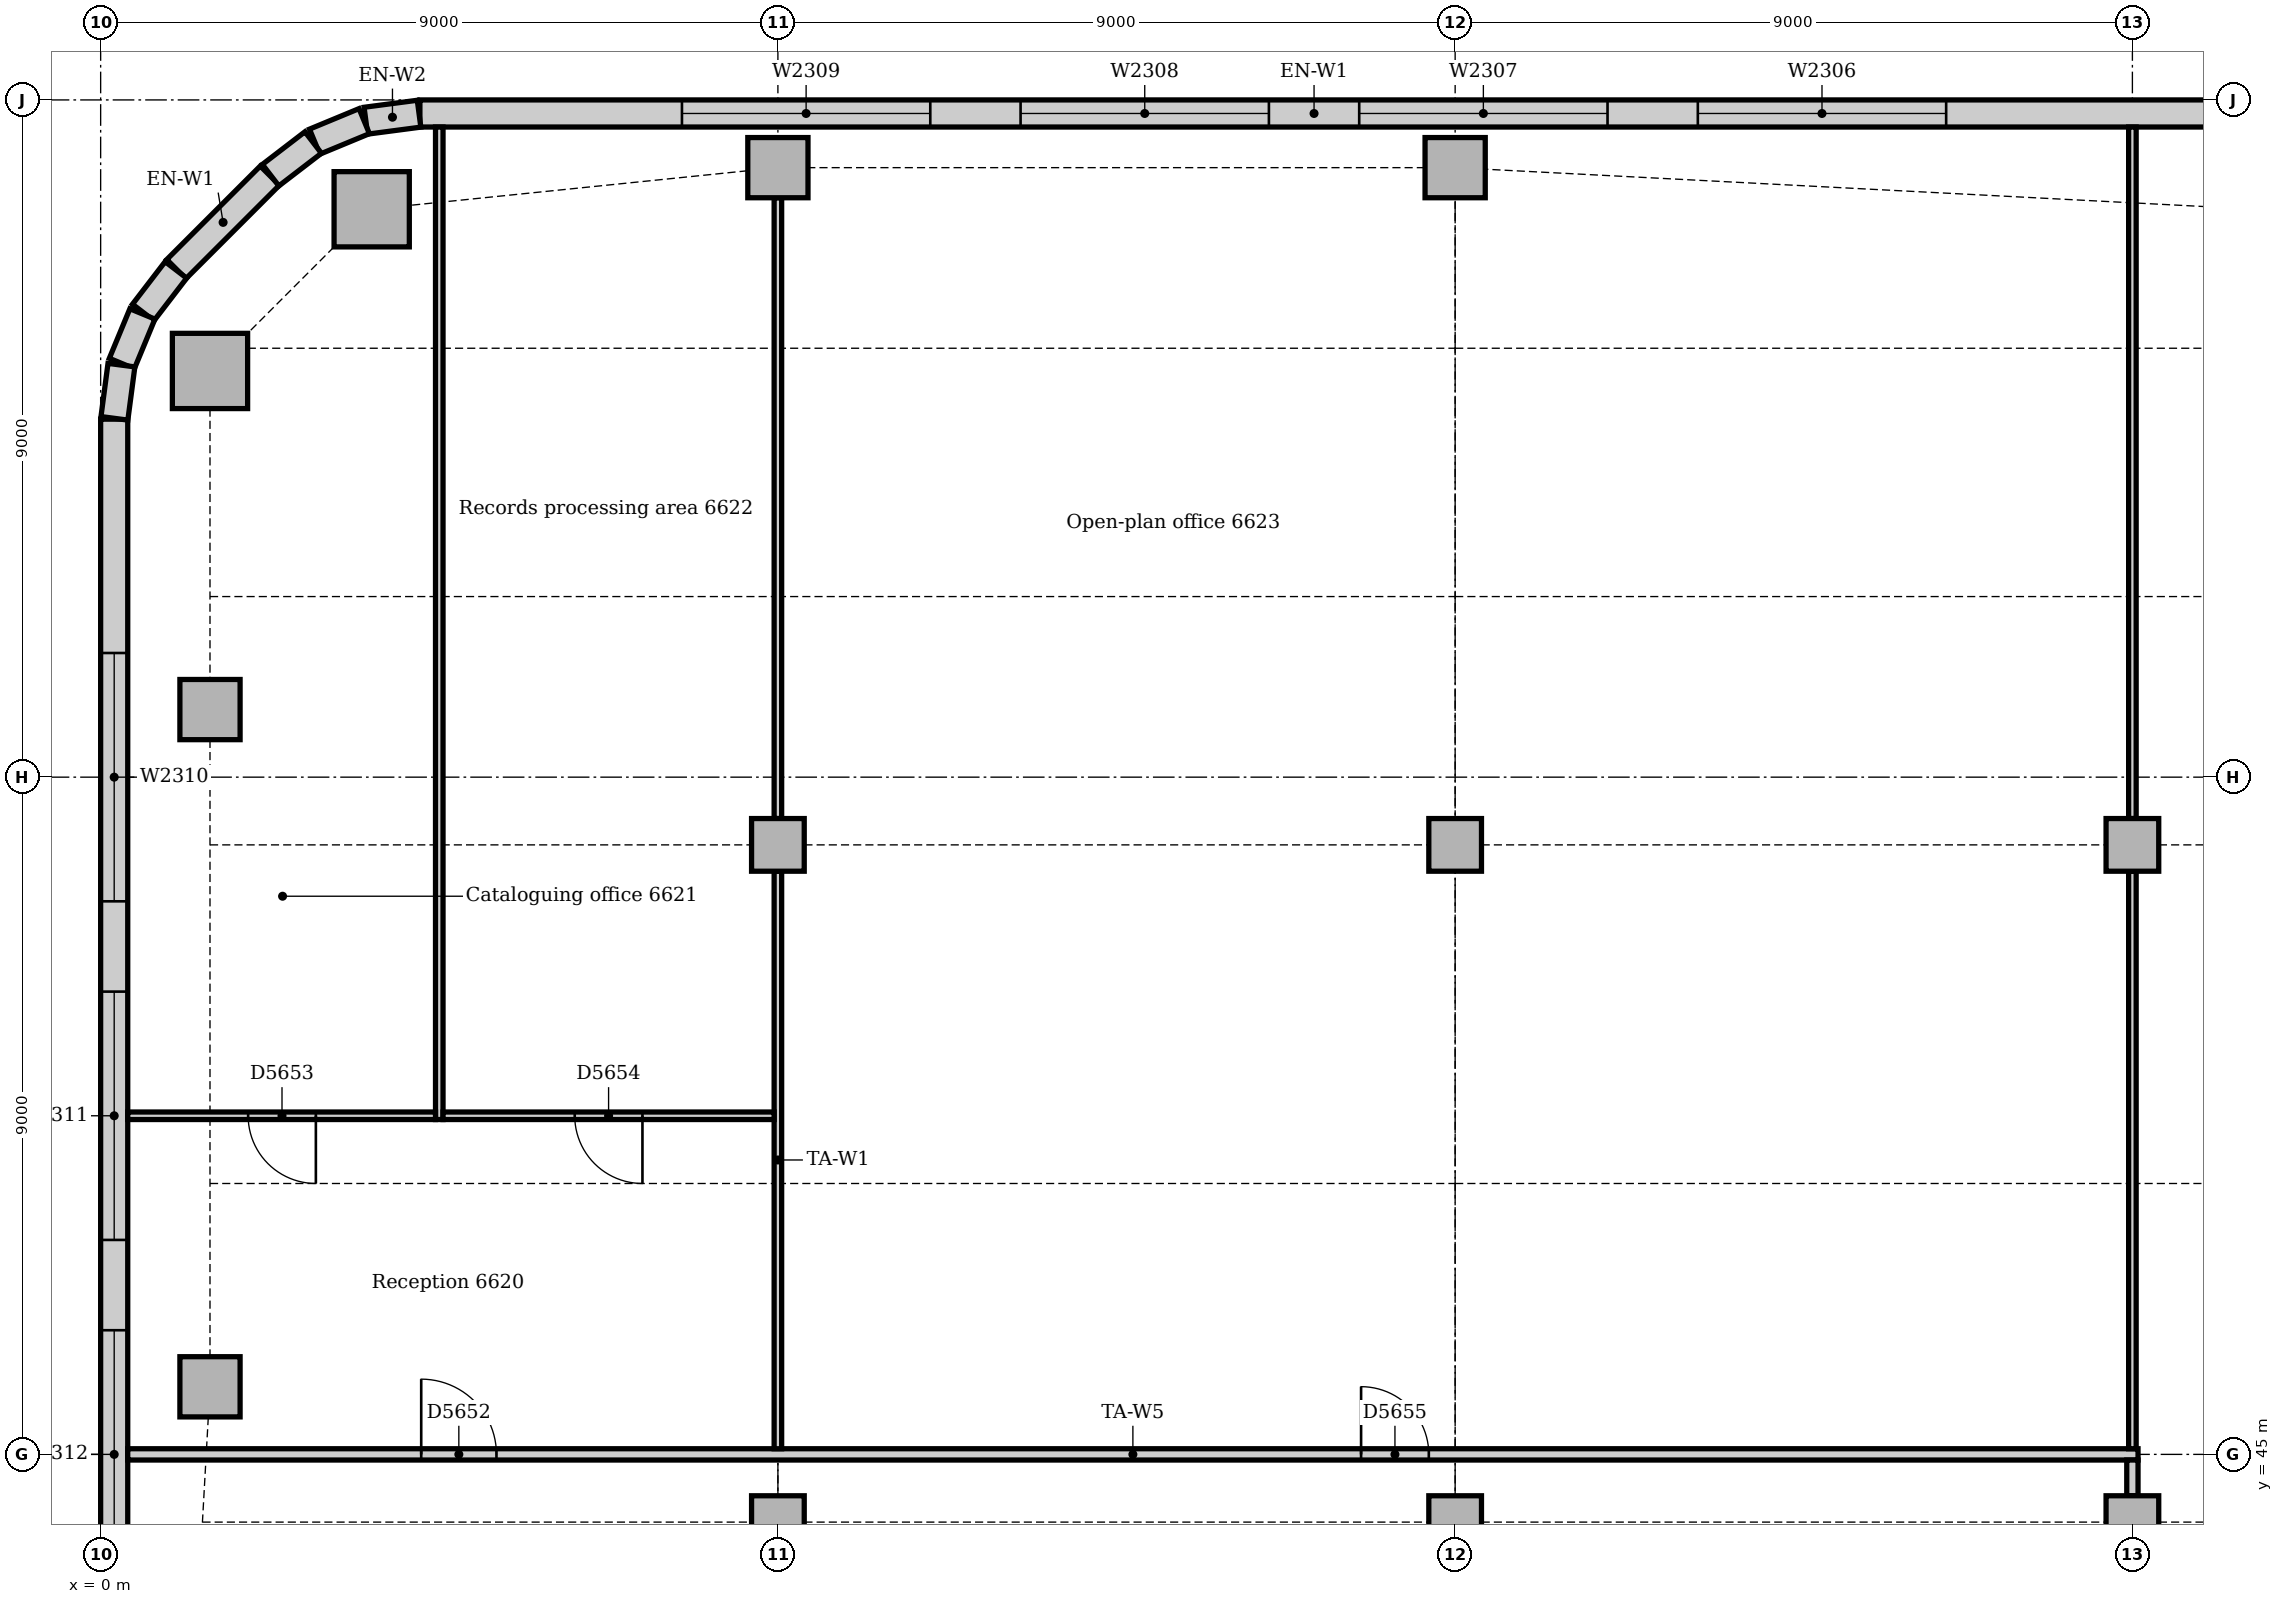
"""IFC4 building model, lengths in metres.
Left out: names, types, materials, properties, quantities, classifications, styles, units other than length and angle.
Written with IfcOpenShell. Run it as: python <this file> out.ifc"""

import sys

from ifc_helpers import new_model, si_unit, direction, frame, frame_2d, origin, origin_2d, place, context, subcontext, project, spatial, rectangle, extrude, element, fill, save


model = new_model("IFC4")
c1 = context("Model", 3, precision=1e-05, world=origin(), true_north=direction((0.0, 1.0)))
c2 = subcontext(c1, "Body", "Model", "MODEL_VIEW")
j1 = project(units=[si_unit("LENGTHUNIT", "METRE"), si_unit("PLANEANGLEUNIT", "RADIAN")], contexts=[c1])
p1 = place(None, origin())
s1 = spatial("IfcSite", under=j1, at=p1, CompositionType="ELEMENT")
p2 = place(p1, origin())
s2 = spatial("IfcBuilding", under=s1, at=p2, CompositionType="ELEMENT")
p3 = place(p2, frame((0.0, 0.0, 275.0)))
s3 = spatial("IfcBuildingStorey", under=s2, at=p3, CompositionType="ELEMENT", Elevation=275.0)
for number, where, z_axis, x_axis in (
    (1, (3.602, 61.547, 0.0), (0.0, 0.0, 1.0), (1.0, 0.0, 0.0)),
    (2, (1.453, 59.398, 0.0), (0.0, 0.0, 1.0), (1.0, 0.0, 0.0)),
):
    element("IfcColumn", number, at=place(p3, frame(where, z_axis=z_axis, x_axis=x_axis)), inside=s3, PredefinedType="COLUMN", context=c2, shape_type="SweptSolid", body=[
        extrude(rectangle(XDim=1.0, YDim=1.0, at=origin_2d()), origin(), (0.0, 0.0, 1.0), 3.85),
    ])
for number, where, z_axis, x_axis in (
    (3, (9.0, 62.1, 0.0), (0.0, 0.0, 1.0), (1.0, 0.0, 0.0)),
    (4, (18.0, 62.1, 0.0), (0.0, 0.0, 1.0), (1.0, 0.0, 0.0)),
    (5, (1.453, 45.898, 0.0), (0.0, 0.0, 1.0), (1.0, 0.0, 0.0)),
    (6, (1.453, 54.898, 0.0), (0.0, 0.0, 1.0), (1.0, 0.0, 0.0)),
):
    element("IfcColumn", number, at=place(p3, frame(where, z_axis=z_axis, x_axis=x_axis)), inside=s3, PredefinedType="COLUMN", context=c2, shape_type="SweptSolid", body=[
        extrude(rectangle(XDim=0.8, YDim=0.8, at=origin_2d()), origin(), (0.0, 0.0, 1.0), 3.85),
    ])
for number, where, z_axis, x_axis in (
    (7, (9.0, 44.1, 0.0), (0.0, 0.0, 1.0), (1.0, 0.0, 0.0)),
    (8, (9.0, 53.1, 0.0), (0.0, 0.0, 1.0), (1.0, 0.0, 0.0)),
    (9, (18.0, 44.1, 0.0), (0.0, 0.0, 1.0), (1.0, 0.0, 0.0)),
    (10, (18.0, 53.1, 0.0), (0.0, 0.0, 1.0), (1.0, 0.0, 0.0)),
    (11, (27.0, 44.1, 0.0), (0.0, 0.0, 1.0), (1.0, 0.0, 0.0)),
    (12, (27.0, 53.1, 0.0), (0.0, 0.0, 1.0), (1.0, 0.0, 0.0)),
):
    element("IfcColumn", number, at=place(p3, frame(where, z_axis=z_axis, x_axis=x_axis)), inside=s3, PredefinedType="COLUMN", context=c2, shape_type="SweptSolid", body=[
        extrude(rectangle(XDim=0.7, YDim=0.7, at=origin_2d()), origin(), (0.0, 0.0, 1.0), 3.85),
    ])
p4 = place(p3, frame((28.007, 62.82, 0.0), z_axis=(0.0, 0.0, 1.0), x_axis=(-1.0, 0.0, 0.0)))
e13 = element("IfcWall", 13, at=p4, inside=s3, PredefinedType="STANDARD", context=c2, shape_type="SweptSolid", body=[
    extrude(rectangle(XDim=23.765, YDim=0.36, at=frame_2d((11.882, 0.0))), origin(), (0.0, 0.0, 1.0), 3.85),
])
p5 = place(p4, frame((3.482, 0.0, 0.9)))
e14 = element("IfcOpeningElement", 14, at=p5, cuts=e13, PredefinedType="OPENING", context=c2, shape_type="SweptSolid", body=[
    extrude(rectangle(XDim=3.3, YDim=1.6, at=frame_2d((1.65, 0.8))), frame((0.0, 0.19, 0.0), z_axis=(0.0, -1.0, 0.0), x_axis=(1.0, 0.0, 0.0)), (0.0, 0.0, 1.0), 0.38),
])
p6 = place(p4, frame((7.982, 0.0, 0.9)))
e15 = element("IfcOpeningElement", 15, at=p6, cuts=e13, PredefinedType="OPENING", context=c2, shape_type="SweptSolid", body=[
    extrude(rectangle(XDim=3.3, YDim=1.6, at=frame_2d((1.65, 0.8))), frame((0.0, 0.19, 0.0), z_axis=(0.0, -1.0, 0.0), x_axis=(1.0, 0.0, 0.0)), (0.0, 0.0, 1.0), 0.38),
])
p7 = place(p4, frame((12.482, 0.0, 0.9)))
e16 = element("IfcOpeningElement", 16, at=p7, cuts=e13, PredefinedType="OPENING", context=c2, shape_type="SweptSolid", body=[
    extrude(rectangle(XDim=3.3, YDim=1.6, at=frame_2d((1.65, 0.8))), frame((0.0, 0.19, 0.0), z_axis=(0.0, -1.0, 0.0), x_axis=(1.0, 0.0, 0.0)), (0.0, 0.0, 1.0), 0.38),
])
p8 = place(p4, frame((16.982, 0.0, 0.9)))
e17 = element("IfcOpeningElement", 17, at=p8, cuts=e13, PredefinedType="OPENING", context=c2, shape_type="SweptSolid", body=[
    extrude(rectangle(XDim=3.3, YDim=1.6, at=frame_2d((1.65, 0.8))), frame((0.0, 0.19, 0.0), z_axis=(0.0, -1.0, 0.0), x_axis=(1.0, 0.0, 0.0)), (0.0, 0.0, 1.0), 0.38),
])
p9 = place(p3, frame((2.249, 61.994, 0.0), z_axis=(0.0, 0.0, 1.0), x_axis=(-0.707106781187, -0.707106781187, 0.0)))
e18 = element("IfcWall", 18, at=p9, inside=s3, PredefinedType="STANDARD", context=c2, shape_type="SweptSolid", body=[
    extrude(rectangle(XDim=1.757, YDim=0.36, at=frame_2d((0.879, 0.0))), origin(), (0.0, 0.0, 1.0), 3.85),
])
p10 = place(p3, frame((0.18, 58.757, 0.0), z_axis=(0.0, 0.0, 1.0), x_axis=(0.0, -1.0, 0.0)))
e19 = element("IfcWall", 19, at=p10, inside=s3, PredefinedType="STANDARD", context=c2, shape_type="SweptSolid", body=[
    extrude(rectangle(XDim=16.757, YDim=0.36, at=frame_2d((8.379, 0.0))), origin(), (0.0, 0.0, 1.0), 3.85),
])
p11 = place(p10, frame((3.107, 0.0, 0.9)))
e20 = element("IfcOpeningElement", 20, at=p11, cuts=e19, PredefinedType="OPENING", context=c2, shape_type="SweptSolid", body=[
    extrude(rectangle(XDim=3.3, YDim=1.6, at=frame_2d((1.65, 0.8))), frame((0.0, 0.19, 0.0), z_axis=(0.0, -1.0, 0.0), x_axis=(1.0, 0.0, 0.0)), (0.0, 0.0, 1.0), 0.38),
])
p12 = place(p10, frame((7.607, 0.0, 0.9)))
e21 = element("IfcOpeningElement", 21, at=p12, cuts=e19, PredefinedType="OPENING", context=c2, shape_type="SweptSolid", body=[
    extrude(rectangle(XDim=3.3, YDim=1.6, at=frame_2d((1.65, 0.8))), frame((0.0, 0.19, 0.0), z_axis=(0.0, -1.0, 0.0), x_axis=(1.0, 0.0, 0.0)), (0.0, 0.0, 1.0), 0.38),
])
p13 = place(p10, frame((12.107, 0.0, 0.9)))
e22 = element("IfcOpeningElement", 22, at=p13, cuts=e19, PredefinedType="OPENING", context=c2, shape_type="SweptSolid", body=[
    extrude(rectangle(XDim=3.3, YDim=1.6, at=frame_2d((1.65, 0.8))), frame((0.0, 0.19, 0.0), z_axis=(0.0, -1.0, 0.0), x_axis=(1.0, 0.0, 0.0)), (0.0, 0.0, 1.0), 0.38),
])
for number, where, z_axis, x_axis in (
    (23, (4.231, 62.817, 0.0), (0.0, 0.0, 1.0), (-0.991, -0.131, 0.0)),
    (24, (3.503, 62.718, 0.0), (0.0, 0.0, 1.0), (-0.924, -0.383, 0.0)),
):
    element("IfcWall", number, at=place(p3, frame(where, z_axis=z_axis, x_axis=x_axis)), inside=s3, PredefinedType="STANDARD", context=c2, shape_type="SweptSolid", body=[
        extrude(rectangle(XDim=0.713, YDim=0.36, at=frame_2d((0.356, 0.0))), origin(), (0.0, 0.0, 1.0), 3.85),
    ])
for number, where, z_axis, x_axis in (
    (25, (2.825, 62.434, 0.0), (0.0, 0.0, 1.0), (-0.793, -0.609, 0.0)),
    (26, (1.0, 60.741, 0.0), (0.0, 0.0, 1.0), (-0.609, -0.793, 0.0)),
):
    element("IfcWall", number, at=place(p3, frame(where, z_axis=z_axis, x_axis=x_axis)), inside=s3, PredefinedType="STANDARD", context=c2, shape_type="SweptSolid", body=[
        extrude(rectangle(XDim=0.713, YDim=0.36, at=frame_2d((0.357, 0.0))), origin(), (0.0, 0.0, 1.0), 3.85),
    ])
for number, where, z_axis, x_axis in (
    (27, (0.555, 60.156, 0.0), (0.0, 0.0, 1.0), (-0.383, -0.924, 0.0)),
    (28, (0.276, 59.476, 0.0), (0.0, 0.0, 1.0), (-0.131, -0.991, 0.0)),
):
    element("IfcWall", number, at=place(p3, frame(where, z_axis=z_axis, x_axis=x_axis)), inside=s3, PredefinedType="STANDARD", context=c2, shape_type="SweptSolid", body=[
        extrude(rectangle(XDim=0.713, YDim=0.36, at=frame_2d((0.356, 0.0))), origin(), (0.0, 0.0, 1.0), 3.85),
    ])
p14 = place(p3, frame((0.36, 45.0, 0.0), z_axis=(0.0, 0.0, 1.0), x_axis=(1.0, 0.0, 0.0)))
e29 = element("IfcWall", 29, at=p14, inside=s3, PredefinedType="PARTITIONING", context=c2, shape_type="SweptSolid", body=[
    extrude(rectangle(XDim=26.715, YDim=0.15, at=frame_2d((13.357, 0.0))), origin(), (0.0, 0.0, 1.0), 3.85),
])
p15 = place(p14, frame((3.9, 0.0, 0.0)))
e30 = element("IfcOpeningElement", 30, at=p15, cuts=e29, PredefinedType="OPENING", context=c2, shape_type="SweptSolid", body=[
    extrude(rectangle(XDim=1.0, YDim=2.1, at=frame_2d((0.5, 1.05))), frame((0.0, 0.085, 0.0), z_axis=(0.0, -1.0, 0.0), x_axis=(1.0, 0.0, 0.0)), (0.0, 0.0, 1.0), 0.17),
])
p16 = place(p14, frame((16.39, 0.0, 0.0)))
e31 = element("IfcOpeningElement", 31, at=p16, cuts=e29, PredefinedType="OPENING", context=c2, shape_type="SweptSolid", body=[
    extrude(rectangle(XDim=0.9, YDim=2.1, at=frame_2d((0.45, 1.05))), frame((0.0, 0.085, 0.0), z_axis=(0.0, -1.0, 0.0), x_axis=(1.0, 0.0, 0.0)), (0.0, 0.0, 1.0), 0.17),
])
p17 = place(p3, frame((27.0, 44.45, 0.0), z_axis=(0.0, 0.0, 1.0), x_axis=(0.0, 1.0, 0.0)))
e32 = element("IfcWall", 32, at=p17, inside=s3, PredefinedType="PARTITIONING", context=c2, shape_type="SweptSolid", body=[
    extrude(rectangle(XDim=0.475, YDim=0.15, at=frame_2d((0.237, 0.0))), origin(), (0.0, 0.0, 1.0), 3.85),
])
p18 = place(p3, frame((9.0, 45.075, 0.0), z_axis=(0.0, 0.0, 1.0), x_axis=(0.0, 1.0, 0.0)))
e33 = element("IfcWall", 33, at=p18, inside=s3, PredefinedType="PARTITIONING", context=c2, shape_type="SweptSolid", body=[
    extrude(rectangle(XDim=7.675, YDim=0.1, at=frame_2d((3.837, 0.0))), origin(), (0.0, 0.0, 1.0), 3.4),
])
p19 = place(p3, frame((9.0, 53.45, 0.0), z_axis=(0.0, 0.0, 1.0), x_axis=(0.0, 1.0, 0.0)))
e34 = element("IfcWall", 34, at=p19, inside=s3, PredefinedType="PARTITIONING", context=c2, shape_type="SweptSolid", body=[
    extrude(rectangle(XDim=8.25, YDim=0.1, at=frame_2d((4.125, 0.0))), origin(), (0.0, 0.0, 1.0), 3.4),
])
p20 = place(p3, frame((27.0, 45.075, 0.0), z_axis=(0.0, 0.0, 1.0), x_axis=(0.0, 1.0, 0.0)))
e35 = element("IfcWall", 35, at=p20, inside=s3, PredefinedType="PARTITIONING", context=c2, shape_type="SweptSolid", body=[
    extrude(rectangle(XDim=7.675, YDim=0.1, at=frame_2d((3.837, 0.0))), origin(), (0.0, 0.0, 1.0), 3.4),
])
p21 = place(p3, frame((27.0, 53.45, 0.0), z_axis=(0.0, 0.0, 1.0), x_axis=(0.0, 1.0, 0.0)))
e36 = element("IfcWall", 36, at=p21, inside=s3, PredefinedType="PARTITIONING", context=c2, shape_type="SweptSolid", body=[
    extrude(rectangle(XDim=9.19, YDim=0.1, at=frame_2d((4.595, 0.0))), origin(), (0.0, 0.0, 1.0), 3.4),
])
p22 = place(p3, frame((4.5, 49.45, 0.0), z_axis=(0.0, 0.0, 1.0), x_axis=(0.0, 1.0, 0.0)))
e37 = element("IfcWall", 37, at=p22, inside=s3, PredefinedType="PARTITIONING", context=c2, shape_type="SweptSolid", body=[
    extrude(rectangle(XDim=13.19, YDim=0.1, at=frame_2d((6.595, 0.0))), origin(), (0.0, 0.0, 1.0), 3.85),
])
p23 = place(p3, frame((4.55, 49.5, 0.0), z_axis=(0.0, 0.0, 1.0), x_axis=(1.0, 0.0, 0.0)))
e38 = element("IfcWall", 38, at=p23, inside=s3, PredefinedType="PARTITIONING", context=c2, shape_type="SweptSolid", body=[
    extrude(rectangle(XDim=4.4, YDim=0.1, at=frame_2d((2.2, 0.0))), origin(), (0.0, 0.0, 1.0), 3.85),
])
p24 = place(p23, frame((1.75, 0.0, 0.0)))
e39 = element("IfcOpeningElement", 39, at=p24, cuts=e38, PredefinedType="OPENING", context=c2, shape_type="SweptSolid", body=[
    extrude(rectangle(XDim=0.9, YDim=2.1, at=frame_2d((0.45, 1.05))), frame((0.0, 0.06, 0.0), z_axis=(0.0, -1.0, 0.0), x_axis=(1.0, 0.0, 0.0)), (0.0, 0.0, 1.0), 0.12),
])
p25 = place(p3, frame((0.36, 49.5, 0.0), z_axis=(0.0, 0.0, 1.0), x_axis=(1.0, 0.0, 0.0)))
e40 = element("IfcWall", 40, at=p25, inside=s3, PredefinedType="PARTITIONING", context=c2, shape_type="SweptSolid", body=[
    extrude(rectangle(XDim=4.09, YDim=0.1, at=frame_2d((2.045, 0.0))), origin(), (0.0, 0.0, 1.0), 3.85),
])
p26 = place(p25, frame((1.6, 0.0, 0.0)))
e41 = element("IfcOpeningElement", 41, at=p26, cuts=e40, PredefinedType="OPENING", context=c2, shape_type="SweptSolid", body=[
    extrude(rectangle(XDim=0.9, YDim=2.1, at=frame_2d((0.45, 1.05))), frame((0.0, 0.06, 0.0), z_axis=(0.0, -1.0, 0.0), x_axis=(1.0, 0.0, 0.0)), (0.0, 0.0, 1.0), 0.12),
])
p27 = place(p5, origin())
e42 = element("IfcWindow", 42, at=p27, inside=s3, PartitioningType="SINGLE_PANEL", PredefinedType="WINDOW", context=c2, shape_type="SweptSolid", body=[
    extrude(rectangle(XDim=3.3, YDim=1.6, at=frame_2d((1.65, 0.8))), frame((0.0, 0.13, 0.0), z_axis=(0.0, -1.0, 0.0), x_axis=(1.0, 0.0, 0.0)), (0.0, 0.0, 1.0), 0.06),
])
fill(e14, e42)
p28 = place(p6, origin())
e43 = element("IfcWindow", 43, at=p28, inside=s3, PartitioningType="SINGLE_PANEL", PredefinedType="WINDOW", context=c2, shape_type="SweptSolid", body=[
    extrude(rectangle(XDim=3.3, YDim=1.6, at=frame_2d((1.65, 0.8))), frame((0.0, 0.13, 0.0), z_axis=(0.0, -1.0, 0.0), x_axis=(1.0, 0.0, 0.0)), (0.0, 0.0, 1.0), 0.06),
])
fill(e15, e43)
p29 = place(p7, origin())
e44 = element("IfcWindow", 44, at=p29, inside=s3, PartitioningType="SINGLE_PANEL", PredefinedType="WINDOW", context=c2, shape_type="SweptSolid", body=[
    extrude(rectangle(XDim=3.3, YDim=1.6, at=frame_2d((1.65, 0.8))), frame((0.0, 0.13, 0.0), z_axis=(0.0, -1.0, 0.0), x_axis=(1.0, 0.0, 0.0)), (0.0, 0.0, 1.0), 0.06),
])
fill(e16, e44)
p30 = place(p8, origin())
e45 = element("IfcWindow", 45, at=p30, inside=s3, PartitioningType="SINGLE_PANEL", PredefinedType="WINDOW", context=c2, shape_type="SweptSolid", body=[
    extrude(rectangle(XDim=3.3, YDim=1.6, at=frame_2d((1.65, 0.8))), frame((0.0, 0.13, 0.0), z_axis=(0.0, -1.0, 0.0), x_axis=(1.0, 0.0, 0.0)), (0.0, 0.0, 1.0), 0.06),
])
fill(e17, e45)
p31 = place(p11, origin())
e46 = element("IfcWindow", 46, at=p31, inside=s3, PartitioningType="SINGLE_PANEL", PredefinedType="WINDOW", context=c2, shape_type="SweptSolid", body=[
    extrude(rectangle(XDim=3.3, YDim=1.6, at=frame_2d((1.65, 0.8))), frame((0.0, 0.13, 0.0), z_axis=(0.0, -1.0, 0.0), x_axis=(1.0, 0.0, 0.0)), (0.0, 0.0, 1.0), 0.06),
])
fill(e20, e46)
p32 = place(p12, origin())
e47 = element("IfcWindow", 47, at=p32, inside=s3, PartitioningType="SINGLE_PANEL", PredefinedType="WINDOW", context=c2, shape_type="SweptSolid", body=[
    extrude(rectangle(XDim=3.3, YDim=1.6, at=frame_2d((1.65, 0.8))), frame((0.0, 0.13, 0.0), z_axis=(0.0, -1.0, 0.0), x_axis=(1.0, 0.0, 0.0)), (0.0, 0.0, 1.0), 0.06),
])
fill(e21, e47)
p33 = place(p13, origin())
e48 = element("IfcWindow", 48, at=p33, inside=s3, PartitioningType="SINGLE_PANEL", PredefinedType="WINDOW", context=c2, shape_type="SweptSolid", body=[
    extrude(rectangle(XDim=3.3, YDim=1.6, at=frame_2d((1.65, 0.8))), frame((0.0, 0.13, 0.0), z_axis=(0.0, -1.0, 0.0), x_axis=(1.0, 0.0, 0.0)), (0.0, 0.0, 1.0), 0.06),
])
fill(e22, e48)
p34 = place(p15, origin())
e49 = element("IfcDoor", 49, at=p34, inside=s3, OperationType="SINGLE_SWING_LEFT", PredefinedType="DOOR", context=c2, shape_type="SweptSolid", body=[
    extrude(rectangle(XDim=1.0, YDim=2.1, at=frame_2d((0.5, 1.05))), frame((0.0, 0.025, 0.0), z_axis=(0.0, -1.0, 0.0), x_axis=(1.0, 0.0, 0.0)), (0.0, 0.0, 1.0), 0.05),
])
fill(e30, e49)
p35 = place(p26, frame((0.9, 0.0, 0.0), z_axis=(0.0, 0.0, 1.0), x_axis=(-1.0, 0.0, 0.0)))
e50 = element("IfcDoor", 50, at=p35, inside=s3, OperationType="SINGLE_SWING_LEFT", PredefinedType="DOOR", context=c2, shape_type="SweptSolid", body=[
    extrude(rectangle(XDim=0.9, YDim=2.1, at=frame_2d((0.45, 1.05))), frame((0.0, 0.025, 0.0), z_axis=(0.0, -1.0, 0.0), x_axis=(1.0, 0.0, 0.0)), (0.0, 0.0, 1.0), 0.05),
])
fill(e41, e50)
p36 = place(p24, frame((0.9, 0.0, 0.0), z_axis=(0.0, 0.0, 1.0), x_axis=(-1.0, 0.0, 0.0)))
e51 = element("IfcDoor", 51, at=p36, inside=s3, OperationType="SINGLE_SWING_LEFT", PredefinedType="DOOR", context=c2, shape_type="SweptSolid", body=[
    extrude(rectangle(XDim=0.9, YDim=2.1, at=frame_2d((0.45, 1.05))), frame((0.0, 0.025, 0.0), z_axis=(0.0, -1.0, 0.0), x_axis=(1.0, 0.0, 0.0)), (0.0, 0.0, 1.0), 0.05),
])
fill(e39, e51)
p37 = place(p16, origin())
e52 = element("IfcDoor", 52, at=p37, inside=s3, OperationType="SINGLE_SWING_LEFT", PredefinedType="DOOR", context=c2, shape_type="SweptSolid", body=[
    extrude(rectangle(XDim=0.9, YDim=2.1, at=frame_2d((0.45, 1.05))), frame((0.0, 0.025, 0.0), z_axis=(0.0, -1.0, 0.0), x_axis=(1.0, 0.0, 0.0)), (0.0, 0.0, 1.0), 0.05),
])
fill(e31, e52)
save(model, sys.argv[1])
